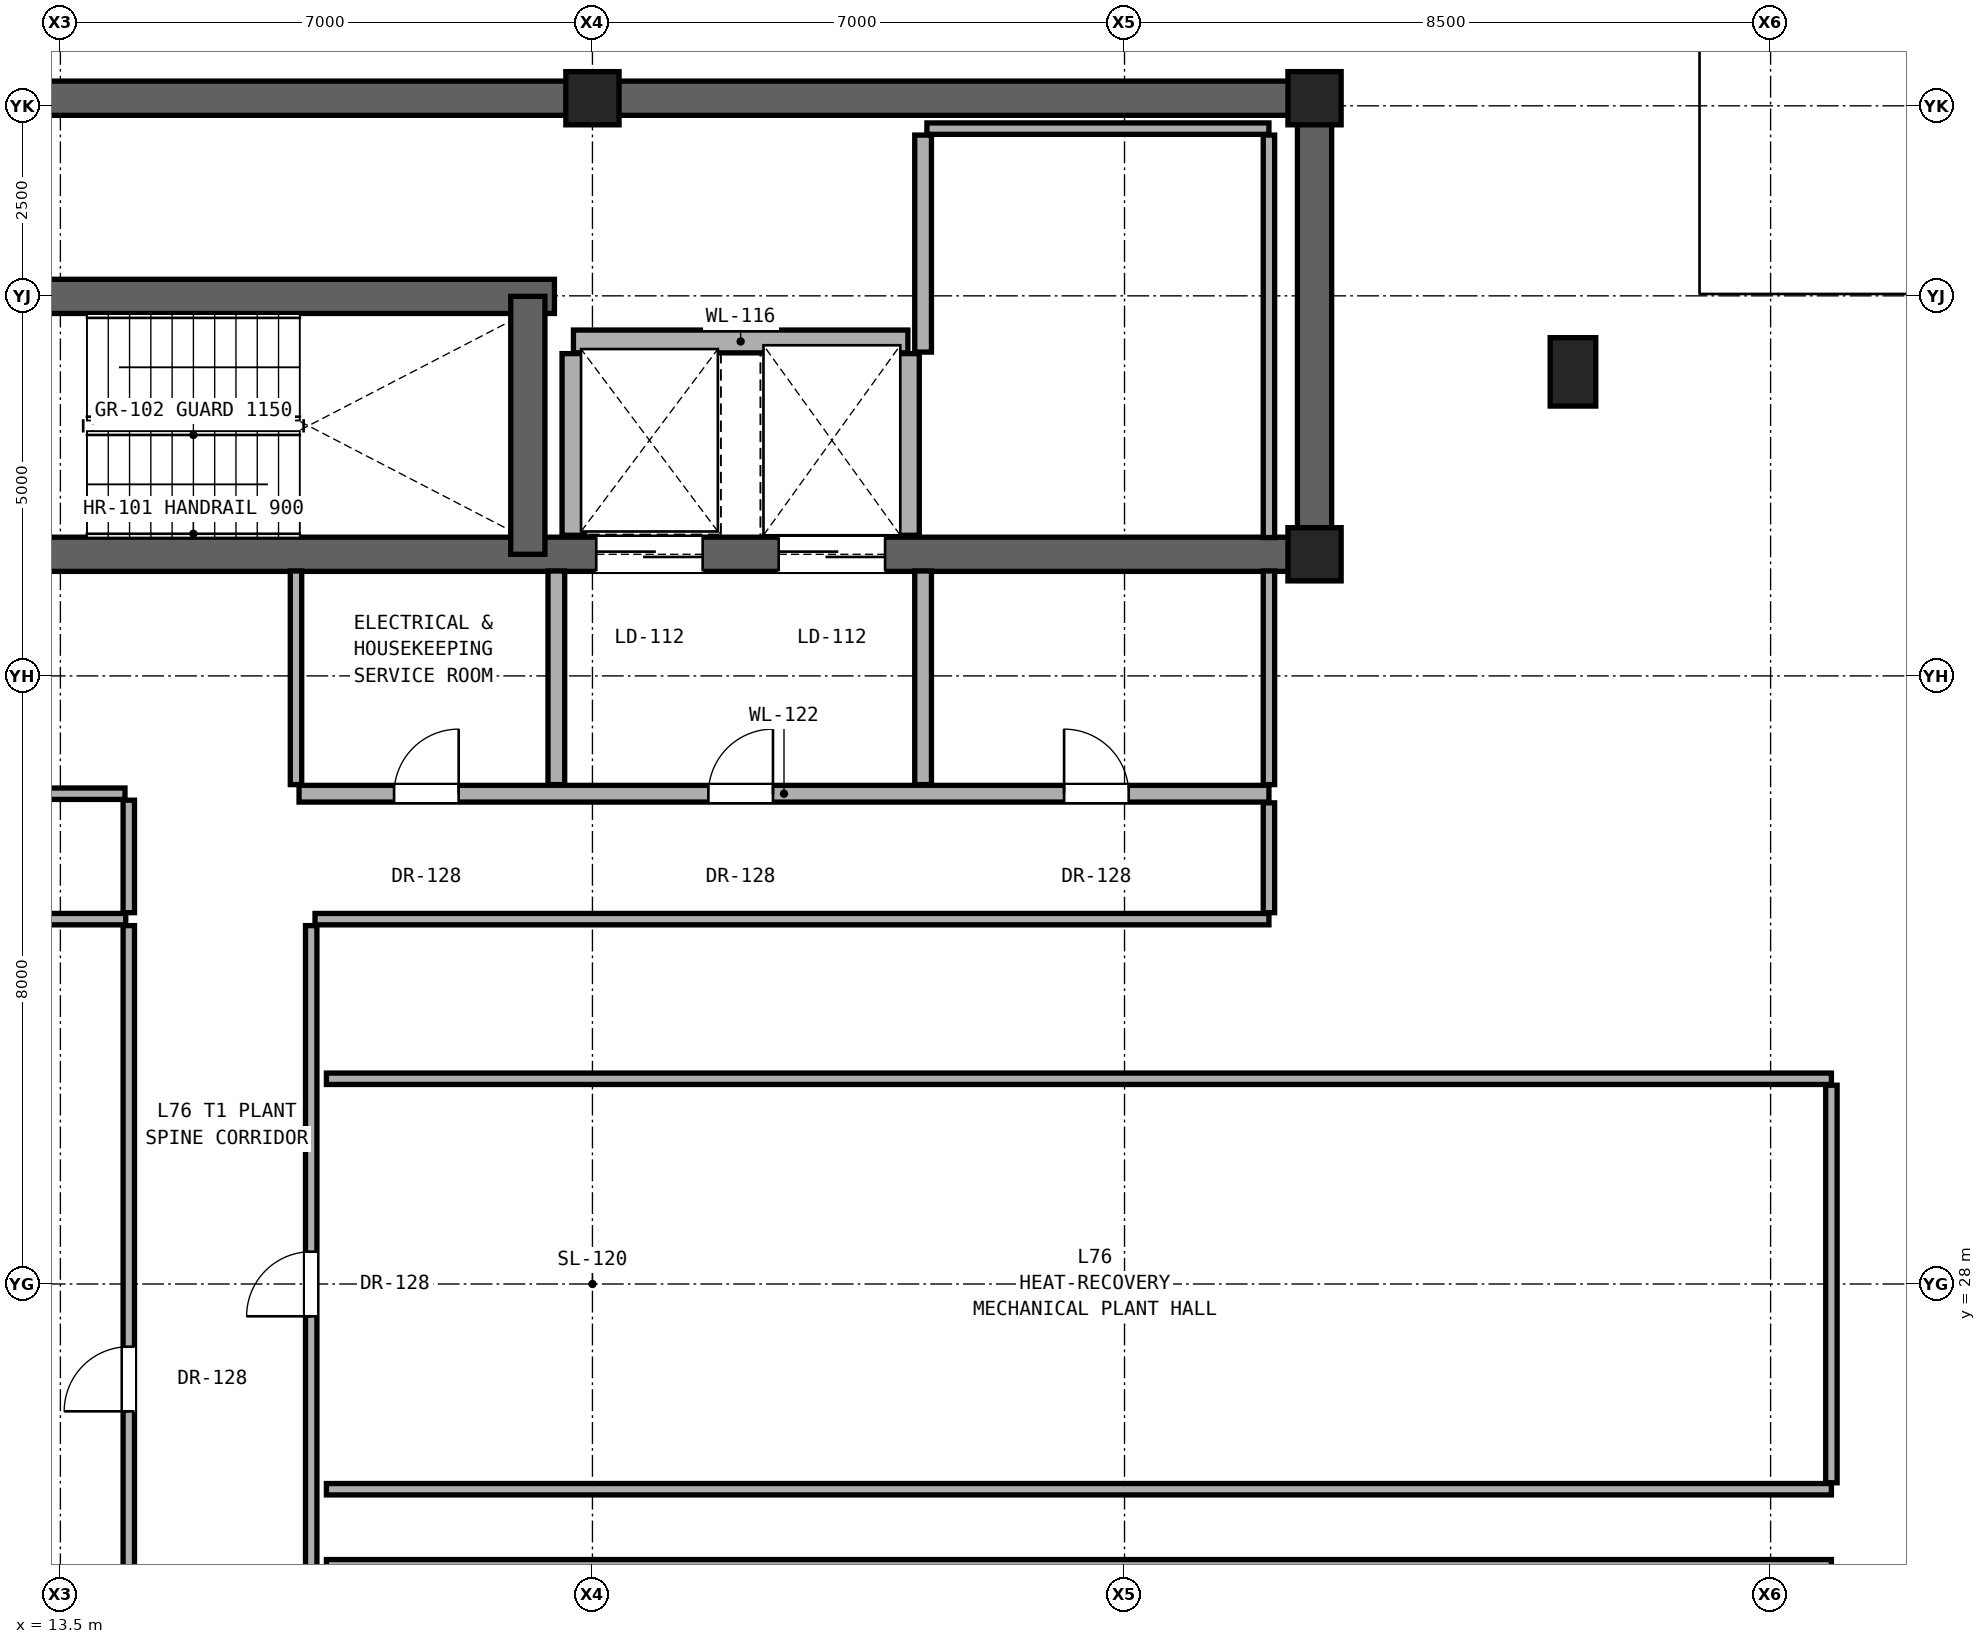
"""IFC4 building model, lengths in metres.
Left out: names, types, materials, properties, quantities, classifications, styles, units other than length and angle.
Written with IfcOpenShell. Run it as: python <this file> out.ifc"""

import sys

from ifc_helpers import new_model, si_unit, direction, frame, frame_2d, origin, origin_2d, place, context, subcontext, project, spatial, rectangle, extrude, element, fill, save


model = new_model("IFC4")
c1 = context("Model", 3, precision=1e-05, world=origin(), true_north=direction((0.0, 1.0)))
c2 = subcontext(c1, "Body", "Model", "MODEL_VIEW")
j1 = project(units=[si_unit("LENGTHUNIT", "METRE"), si_unit("PLANEANGLEUNIT", "RADIAN")], contexts=[c1])
p1 = place(None, origin())
s1 = spatial("IfcSite", under=j1, at=p1, CompositionType="ELEMENT")
p2 = place(p1, origin())
s2 = spatial("IfcBuilding", under=s1, at=p2, CompositionType="ELEMENT")
p3 = place(p2, frame((0.0, 0.0, 266.1)))
s3 = spatial("IfcBuildingStorey", under=s2, at=p3, CompositionType="ELEMENT", Elevation=266.1)
for number, where, z_axis, x_axis in (
    (1, (30.0, 37.6, 0.0), (0.0, 0.0, 1.0), (1.0, 0.0, 0.0)),
    (2, (20.5, 43.6, 0.0), (0.0, 0.0, 1.0), (1.0, 0.0, 0.0)),
    (3, (30.0, 43.6, 0.0), (0.0, 0.0, 1.0), (1.0, 0.0, 0.0)),
):
    element("IfcColumn", number, at=place(p3, frame(where, z_axis=z_axis, x_axis=x_axis)), inside=s3, PredefinedType="COLUMN", context=c2, shape_type="SweptSolid", body=[
        extrude(rectangle(XDim=0.7, YDim=0.7, at=origin_2d()), origin(), (0.0, 0.0, 1.0), 2.6),
    ])
p4 = place(p3, frame((33.4, 40.0, 0.0), z_axis=(0.0, 0.0, 1.0), x_axis=(1.0, 0.0, 0.0)))
e4 = element("IfcColumn", 4, at=p4, inside=s3, PredefinedType="PILASTER", context=c2, shape_type="SweptSolid", body=[
    extrude(rectangle(XDim=0.6, YDim=0.9, at=origin_2d()), origin(), (0.0, 0.0, 1.0), 2.6),
])
p5 = place(p3, frame((11.0, 43.6, 0.0), z_axis=(0.0, 0.0, 1.0), x_axis=(1.0, 0.0, 0.0)))
e5 = element("IfcWall", 5, at=p5, inside=s3, PredefinedType="SHEAR", context=c2, shape_type="SweptSolid", body=[
    extrude(rectangle(XDim=19.0, YDim=0.45, at=frame_2d((9.5, 0.0))), origin(), (0.0, 0.0, 1.0), 2.38),
])
p6 = place(p3, frame((30.0, 37.6, 0.0), z_axis=(0.0, 0.0, 1.0), x_axis=(0.0, 1.0, 0.0)))
e6 = element("IfcWall", 6, at=p6, inside=s3, PredefinedType="SHEAR", context=c2, shape_type="SweptSolid", body=[
    extrude(rectangle(XDim=6.0, YDim=0.45, at=frame_2d((3.0, 0.0))), origin(), (0.0, 0.0, 1.0), 2.38),
])
p7 = place(p3, frame((11.0, 37.6, 0.0), z_axis=(0.0, 0.0, 1.0), x_axis=(1.0, 0.0, 0.0)))
e7 = element("IfcWall", 7, at=p7, inside=s3, PredefinedType="SHEAR", context=c2, shape_type="SweptSolid", body=[
    extrude(rectangle(XDim=19.0, YDim=0.45, at=frame_2d((9.5, 0.0))), origin(), (0.0, 0.0, 1.0), 2.38),
])
p8 = place(p7, frame((1.06, 0.0, 0.0)))
e8 = element("IfcOpeningElement", 8, at=p8, cuts=e7, PredefinedType="OPENING", context=c2, shape_type="SweptSolid", body=[
    extrude(rectangle(XDim=1.15, YDim=2.2, at=frame_2d((0.575, 1.1))), frame((0.0, 0.235, 0.0), z_axis=(0.0, -1.0, 0.0), x_axis=(1.0, 0.0, 0.0)), (0.0, 0.0, 1.0), 0.47),
])
p9 = place(p7, frame((9.55, 0.0, 0.0)))
e9 = element("IfcOpeningElement", 9, at=p9, cuts=e7, PredefinedType="OPENING", context=c2, shape_type="SweptSolid", body=[
    extrude(rectangle(XDim=1.4, YDim=2.35, at=frame_2d((0.7, 1.175))), frame((0.0, 0.235, 0.0), z_axis=(0.0, -1.0, 0.0), x_axis=(1.0, 0.0, 0.0)), (0.0, 0.0, 1.0), 0.47),
])
p10 = place(p7, frame((11.95, 0.0, 0.0)))
e10 = element("IfcOpeningElement", 10, at=p10, cuts=e7, PredefinedType="OPENING", context=c2, shape_type="SweptSolid", body=[
    extrude(rectangle(XDim=1.4, YDim=2.35, at=frame_2d((0.7, 1.175))), frame((0.0, 0.235, 0.0), z_axis=(0.0, -1.0, 0.0), x_axis=(1.0, 0.0, 0.0)), (0.0, 0.0, 1.0), 0.47),
])
p11 = place(p3, frame((11.0, 40.993, 0.0), z_axis=(0.0, 0.0, 1.0), x_axis=(1.0, 0.0, 0.0)))
e11 = element("IfcWall", 11, at=p11, inside=s3, PredefinedType="SHEAR", context=c2, shape_type="SweptSolid", body=[
    extrude(rectangle(XDim=9.0, YDim=0.45, at=frame_2d((4.5, 0.0))), origin(), (0.0, 0.0, 1.0), 2.38),
])
p12 = place(p3, frame((19.65, 37.6, 0.0), z_axis=(0.0, 0.0, 1.0), x_axis=(0.0, 1.0, 0.0)))
e12 = element("IfcWall", 12, at=p12, inside=s3, PredefinedType="SHEAR", context=c2, shape_type="SweptSolid", body=[
    extrude(rectangle(XDim=3.393, YDim=0.45, at=frame_2d((1.696, 0.0))), origin(), (0.0, 0.0, 1.0), 2.38),
])
for number, where, z_axis, x_axis in (
    (13, (17.0, 24.3, 0.0), (0.0, 0.0, 1.0), (1.0, 0.0, 0.0)),
    (14, (17.0, 25.3, 0.0), (0.0, 0.0, 1.0), (1.0, 0.0, 0.0)),
    (15, (17.0, 30.7, 0.0), (0.0, 0.0, 1.0), (1.0, 0.0, 0.0)),
):
    element("IfcWall", number, at=place(p3, frame(where, z_axis=z_axis, x_axis=x_axis)), inside=s3, PredefinedType="PARTITIONING", context=c2, shape_type="SweptSolid", body=[
        extrude(rectangle(XDim=19.8, YDim=0.15, at=frame_2d((9.9, 0.0))), origin(), (0.0, 0.0, 1.0), 2.042),
    ])
p13 = place(p3, frame((3.2, 32.8, 0.0), z_axis=(0.0, 0.0, 1.0), x_axis=(1.0, 0.0, 0.0)))
e16 = element("IfcWall", 16, at=p13, inside=s3, PredefinedType="PARTITIONING", context=c2, shape_type="SweptSolid", body=[
    extrude(rectangle(XDim=11.16, YDim=0.15, at=frame_2d((5.58, 0.0))), origin(), (0.0, 0.0, 1.0), 2.042),
])
p14 = place(p3, frame((16.85, 32.8, 0.0), z_axis=(0.0, 0.0, 1.0), x_axis=(1.0, 0.0, 0.0)))
e17 = element("IfcWall", 17, at=p14, inside=s3, PredefinedType="PARTITIONING", context=c2, shape_type="SweptSolid", body=[
    extrude(rectangle(XDim=12.55, YDim=0.15, at=frame_2d((6.275, 0.0))), origin(), (0.0, 0.0, 1.0), 2.042),
])
p15 = place(p3, frame((11.85, 34.45, 0.0), z_axis=(0.0, 0.0, 1.0), x_axis=(1.0, 0.0, 0.0)))
e18 = element("IfcWall", 18, at=p15, inside=s3, PredefinedType="PARTITIONING", context=c2, shape_type="SweptSolid", body=[
    extrude(rectangle(XDim=2.5, YDim=0.15, at=frame_2d((1.25, 0.0))), origin(), (0.0, 0.0, 1.0), 2.38),
])
p16 = place(p3, frame((16.64, 34.45, 0.0), z_axis=(0.0, 0.0, 1.0), x_axis=(1.0, 0.0, 0.0)))
e19 = element("IfcWall", 19, at=p16, inside=s3, PredefinedType="SOLIDWALL", context=c2, shape_type="SweptSolid", body=[
    extrude(rectangle(XDim=12.76, YDim=0.22, at=frame_2d((6.38, 0.0))), origin(), (0.0, 0.0, 1.0), 2.042),
])
p17 = place(p16, frame((5.385, 0.0, 0.0)))
e20 = element("IfcOpeningElement", 20, at=p17, cuts=e19, PredefinedType="OPENING", context=c2, shape_type="SweptSolid", body=[
    extrude(rectangle(XDim=0.85, YDim=2.01, at=frame_2d((0.425, 1.005))), frame((0.0, 0.12, 0.0), z_axis=(0.0, -1.0, 0.0), x_axis=(1.0, 0.0, 0.0)), (0.0, 0.0, 1.0), 0.24),
])
p18 = place(p16, frame((10.065, 0.0, 0.0)))
e21 = element("IfcOpeningElement", 21, at=p18, cuts=e19, PredefinedType="OPENING", context=c2, shape_type="SweptSolid", body=[
    extrude(rectangle(XDim=0.85, YDim=2.01, at=frame_2d((0.425, 1.005))), frame((0.0, 0.12, 0.0), z_axis=(0.0, -1.0, 0.0), x_axis=(1.0, 0.0, 0.0)), (0.0, 0.0, 1.0), 0.24),
])
p19 = place(p16, frame((1.25, 0.0, 0.0)))
e22 = element("IfcOpeningElement", 22, at=p19, cuts=e19, PredefinedType="OPENING", context=c2, shape_type="SweptSolid", body=[
    extrude(rectangle(XDim=0.85, YDim=2.01, at=frame_2d((0.425, 1.005))), frame((0.0, 0.12, 0.0), z_axis=(0.0, -1.0, 0.0), x_axis=(1.0, 0.0, 0.0)), (0.0, 0.0, 1.0), 0.24),
])
p20 = place(p3, frame((20.25, 40.4, 0.0), z_axis=(0.0, 0.0, 1.0), x_axis=(1.0, 0.0, 0.0)))
e23 = element("IfcWall", 23, at=p20, inside=s3, PredefinedType="SOLIDWALL", context=c2, shape_type="SweptSolid", body=[
    extrude(rectangle(XDim=4.4, YDim=0.3, at=frame_2d((2.2, 0.0))), origin(), (0.0, 0.0, 1.0), 2.38),
])
p21 = place(p3, frame((24.9, 43.2, 0.0), z_axis=(0.0, 0.0, 1.0), x_axis=(1.0, 0.0, 0.0)))
e24 = element("IfcWall", 24, at=p21, inside=s3, PredefinedType="PARTITIONING", context=c2, shape_type="SweptSolid", body=[
    extrude(rectangle(XDim=4.5, YDim=0.15, at=frame_2d((2.25, 0.0))), origin(), (0.0, 0.0, 1.0), 2.38),
])
p22 = place(p3, frame((14.4, 20.785, 0.0), z_axis=(0.0, 0.0, 1.0), x_axis=(0.0, 1.0, 0.0)))
e25 = element("IfcWall", 25, at=p22, inside=s3, PredefinedType="PARTITIONING", context=c2, shape_type="SweptSolid", body=[
    extrude(rectangle(XDim=11.93, YDim=0.15, at=frame_2d((5.965, 0.0))), origin(), (0.0, 0.0, 1.0), 2.042),
])
p23 = place(p22, frame((5.54, 0.0, 0.0)))
e26 = element("IfcOpeningElement", 26, at=p23, cuts=e25, PredefinedType="OPENING", context=c2, shape_type="SweptSolid", body=[
    extrude(rectangle(XDim=0.85, YDim=2.01, at=frame_2d((0.425, 1.005))), frame((0.0, 0.085, 0.0), z_axis=(0.0, -1.0, 0.0), x_axis=(1.0, 0.0, 0.0)), (0.0, 0.0, 1.0), 0.17),
])
p24 = place(p3, frame((14.4, 32.885, 0.0), z_axis=(0.0, 0.0, 1.0), x_axis=(0.0, 1.0, 0.0)))
e27 = element("IfcWall", 27, at=p24, inside=s3, PredefinedType="PARTITIONING", context=c2, shape_type="SweptSolid", body=[
    extrude(rectangle(XDim=1.48, YDim=0.15, at=frame_2d((0.74, 0.0))), origin(), (0.0, 0.0, 1.0), 2.38),
])
p25 = place(p3, frame((16.6, 34.57, 0.0), z_axis=(0.0, 0.0, 1.0), x_axis=(0.0, 1.0, 0.0)))
e28 = element("IfcWall", 28, at=p25, inside=s3, PredefinedType="PARTITIONING", context=c2, shape_type="SweptSolid", body=[
    extrude(rectangle(XDim=2.81, YDim=0.15, at=frame_2d((1.405, 0.0))), origin(), (0.0, 0.0, 1.0), 2.38),
])
p26 = place(p3, frame((16.8, 20.785, 0.0), z_axis=(0.0, 0.0, 1.0), x_axis=(0.0, 1.0, 0.0)))
e29 = element("IfcWall", 29, at=p26, inside=s3, PredefinedType="PARTITIONING", context=c2, shape_type="SweptSolid", body=[
    extrude(rectangle(XDim=11.93, YDim=0.15, at=frame_2d((5.965, 0.0))), origin(), (0.0, 0.0, 1.0), 2.042),
])
p27 = place(p26, frame((6.79, 0.0, 0.0)))
e30 = element("IfcOpeningElement", 30, at=p27, cuts=e29, PredefinedType="OPENING", context=c2, shape_type="SweptSolid", body=[
    extrude(rectangle(XDim=0.85, YDim=2.01, at=frame_2d((0.425, 1.005))), frame((0.0, 0.085, 0.0), z_axis=(0.0, -1.0, 0.0), x_axis=(1.0, 0.0, 0.0)), (0.0, 0.0, 1.0), 0.17),
])
p28 = place(p26, frame((1.39, 0.0, 0.0)))
e31 = element("IfcOpeningElement", 31, at=p28, cuts=e29, PredefinedType="OPENING", context=c2, shape_type="SweptSolid", body=[
    extrude(rectangle(XDim=0.85, YDim=2.01, at=frame_2d((0.425, 1.005))), frame((0.0, 0.085, 0.0), z_axis=(0.0, -1.0, 0.0), x_axis=(1.0, 0.0, 0.0)), (0.0, 0.0, 1.0), 0.17),
])
p29 = place(p3, frame((20.025, 34.57, 0.0), z_axis=(0.0, 0.0, 1.0), x_axis=(0.0, 1.0, 0.0)))
e32 = element("IfcWall", 32, at=p29, inside=s3, PredefinedType="SOLIDWALL", context=c2, shape_type="SweptSolid", body=[
    extrude(rectangle(XDim=2.81, YDim=0.22, at=frame_2d((1.405, 0.0))), origin(), (0.0, 0.0, 1.0), 2.38),
])
for number, where, z_axis, x_axis in (
    (33, (20.25, 37.85, 0.0), (0.0, 0.0, 1.0), (0.0, 1.0, 0.0)),
    (34, (24.65, 37.85, 0.0), (0.0, 0.0, 1.0), (0.0, 1.0, 0.0)),
):
    element("IfcWall", number, at=place(p3, frame(where, z_axis=z_axis, x_axis=x_axis)), inside=s3, PredefinedType="SOLIDWALL", context=c2, shape_type="SweptSolid", body=[
        extrude(rectangle(XDim=2.39, YDim=0.3, at=frame_2d((1.195, 0.0))), origin(), (0.0, 0.0, 1.0), 2.38),
    ])
p30 = place(p3, frame((24.85, 34.57, 0.0), z_axis=(0.0, 0.0, 1.0), x_axis=(0.0, 1.0, 0.0)))
e35 = element("IfcWall", 35, at=p30, inside=s3, PredefinedType="SOLIDWALL", context=c2, shape_type="SweptSolid", body=[
    extrude(rectangle(XDim=2.81, YDim=0.22, at=frame_2d((1.405, 0.0))), origin(), (0.0, 0.0, 1.0), 2.38),
])
p31 = place(p3, frame((24.85, 40.26, 0.0), z_axis=(0.0, 0.0, 1.0), x_axis=(0.0, 1.0, 0.0)))
e36 = element("IfcWall", 36, at=p31, inside=s3, PredefinedType="SOLIDWALL", context=c2, shape_type="SweptSolid", body=[
    extrude(rectangle(XDim=2.855, YDim=0.22, at=frame_2d((1.427, 0.0))), origin(), (0.0, 0.0, 1.0), 2.38),
])
p32 = place(p3, frame((29.4, 32.885, 0.0), z_axis=(0.0, 0.0, 1.0), x_axis=(0.0, 1.0, 0.0)))
e37 = element("IfcWall", 37, at=p32, inside=s3, PredefinedType="PARTITIONING", context=c2, shape_type="SweptSolid", body=[
    extrude(rectangle(XDim=1.445, YDim=0.15, at=frame_2d((0.723, 0.0))), origin(), (0.0, 0.0, 1.0), 2.38),
])
p33 = place(p3, frame((29.4, 34.57, 0.0), z_axis=(0.0, 0.0, 1.0), x_axis=(0.0, 1.0, 0.0)))
e38 = element("IfcWall", 38, at=p33, inside=s3, PredefinedType="PARTITIONING", context=c2, shape_type="SweptSolid", body=[
    extrude(rectangle(XDim=2.81, YDim=0.15, at=frame_2d((1.405, 0.0))), origin(), (0.0, 0.0, 1.0), 2.38),
])
p34 = place(p3, frame((29.4, 37.82, 0.0), z_axis=(0.0, 0.0, 1.0), x_axis=(0.0, 1.0, 0.0)))
e39 = element("IfcWall", 39, at=p34, inside=s3, PredefinedType="PARTITIONING", context=c2, shape_type="SweptSolid", body=[
    extrude(rectangle(XDim=5.295, YDim=0.15, at=frame_2d((2.647, 0.0))), origin(), (0.0, 0.0, 1.0), 2.38),
])
p35 = place(p3, frame((36.8, 25.385, 0.0), z_axis=(0.0, 0.0, 1.0), x_axis=(0.0, 1.0, 0.0)))
e40 = element("IfcWall", 40, at=p35, inside=s3, PredefinedType="PARTITIONING", context=c2, shape_type="SweptSolid", body=[
    extrude(rectangle(XDim=5.23, YDim=0.15, at=frame_2d((2.615, 0.0))), origin(), (0.0, 0.0, 1.0), 2.38),
])
p36 = place(p17, origin())
e41 = element("IfcDoor", 41, at=p36, inside=s3, OperationType="SINGLE_SWING_RIGHT", PredefinedType="DOOR", context=c2, shape_type="SweptSolid", body=[
    extrude(rectangle(XDim=0.85, YDim=2.01, at=frame_2d((0.425, 1.005))), frame((0.0, 0.025, 0.0), z_axis=(0.0, -1.0, 0.0), x_axis=(1.0, 0.0, 0.0)), (0.0, 0.0, 1.0), 0.05),
])
fill(e20, e41)
p37 = place(p18, origin())
e42 = element("IfcDoor", 42, at=p37, inside=s3, OperationType="SINGLE_SWING_LEFT", PredefinedType="DOOR", context=c2, shape_type="SweptSolid", body=[
    extrude(rectangle(XDim=0.85, YDim=2.01, at=frame_2d((0.425, 1.005))), frame((0.0, 0.025, 0.0), z_axis=(0.0, -1.0, 0.0), x_axis=(1.0, 0.0, 0.0)), (0.0, 0.0, 1.0), 0.05),
])
fill(e21, e42)
p38 = place(p19, origin())
e43 = element("IfcDoor", 43, at=p38, inside=s3, OperationType="SINGLE_SWING_RIGHT", PredefinedType="DOOR", context=c2, shape_type="SweptSolid", body=[
    extrude(rectangle(XDim=0.85, YDim=2.01, at=frame_2d((0.425, 1.005))), frame((0.0, 0.025, 0.0), z_axis=(0.0, -1.0, 0.0), x_axis=(1.0, 0.0, 0.0)), (0.0, 0.0, 1.0), 0.05),
])
fill(e22, e43)
p39 = place(p27, origin())
e44 = element("IfcDoor", 44, at=p39, inside=s3, OperationType="SINGLE_SWING_LEFT", PredefinedType="DOOR", context=c2, shape_type="SweptSolid", body=[
    extrude(rectangle(XDim=0.85, YDim=2.01, at=frame_2d((0.425, 1.005))), frame((0.0, 0.025, 0.0), z_axis=(0.0, -1.0, 0.0), x_axis=(1.0, 0.0, 0.0)), (0.0, 0.0, 1.0), 0.05),
])
fill(e30, e44)
p40 = place(p23, origin())
e45 = element("IfcDoor", 45, at=p40, inside=s3, OperationType="SINGLE_SWING_LEFT", PredefinedType="DOOR", context=c2, shape_type="SweptSolid", body=[
    extrude(rectangle(XDim=0.85, YDim=2.01, at=frame_2d((0.425, 1.005))), frame((0.0, 0.025, 0.0), z_axis=(0.0, -1.0, 0.0), x_axis=(1.0, 0.0, 0.0)), (0.0, 0.0, 1.0), 0.05),
])
fill(e26, e45)
p41 = place(p9, origin())
e46 = element("IfcDoor", 46, at=p41, inside=s3, OperationType="DOUBLE_DOOR_SLIDING", PredefinedType="DOOR", context=c2, shape_type="SweptSolid", body=[
    extrude(rectangle(XDim=1.4, YDim=2.35, at=frame_2d((0.7, 1.175))), frame((0.0, 0.025, 0.0), z_axis=(0.0, -1.0, 0.0), x_axis=(1.0, 0.0, 0.0)), (0.0, 0.0, 1.0), 0.05),
])
fill(e9, e46)
p42 = place(p10, origin())
e47 = element("IfcDoor", 47, at=p42, inside=s3, OperationType="DOUBLE_DOOR_SLIDING", PredefinedType="DOOR", context=c2, shape_type="SweptSolid", body=[
    extrude(rectangle(XDim=1.4, YDim=2.35, at=frame_2d((0.7, 1.175))), frame((0.0, 0.025, 0.0), z_axis=(0.0, -1.0, 0.0), x_axis=(1.0, 0.0, 0.0)), (0.0, 0.0, 1.0), 0.05),
])
fill(e10, e47)
save(model, sys.argv[1])
